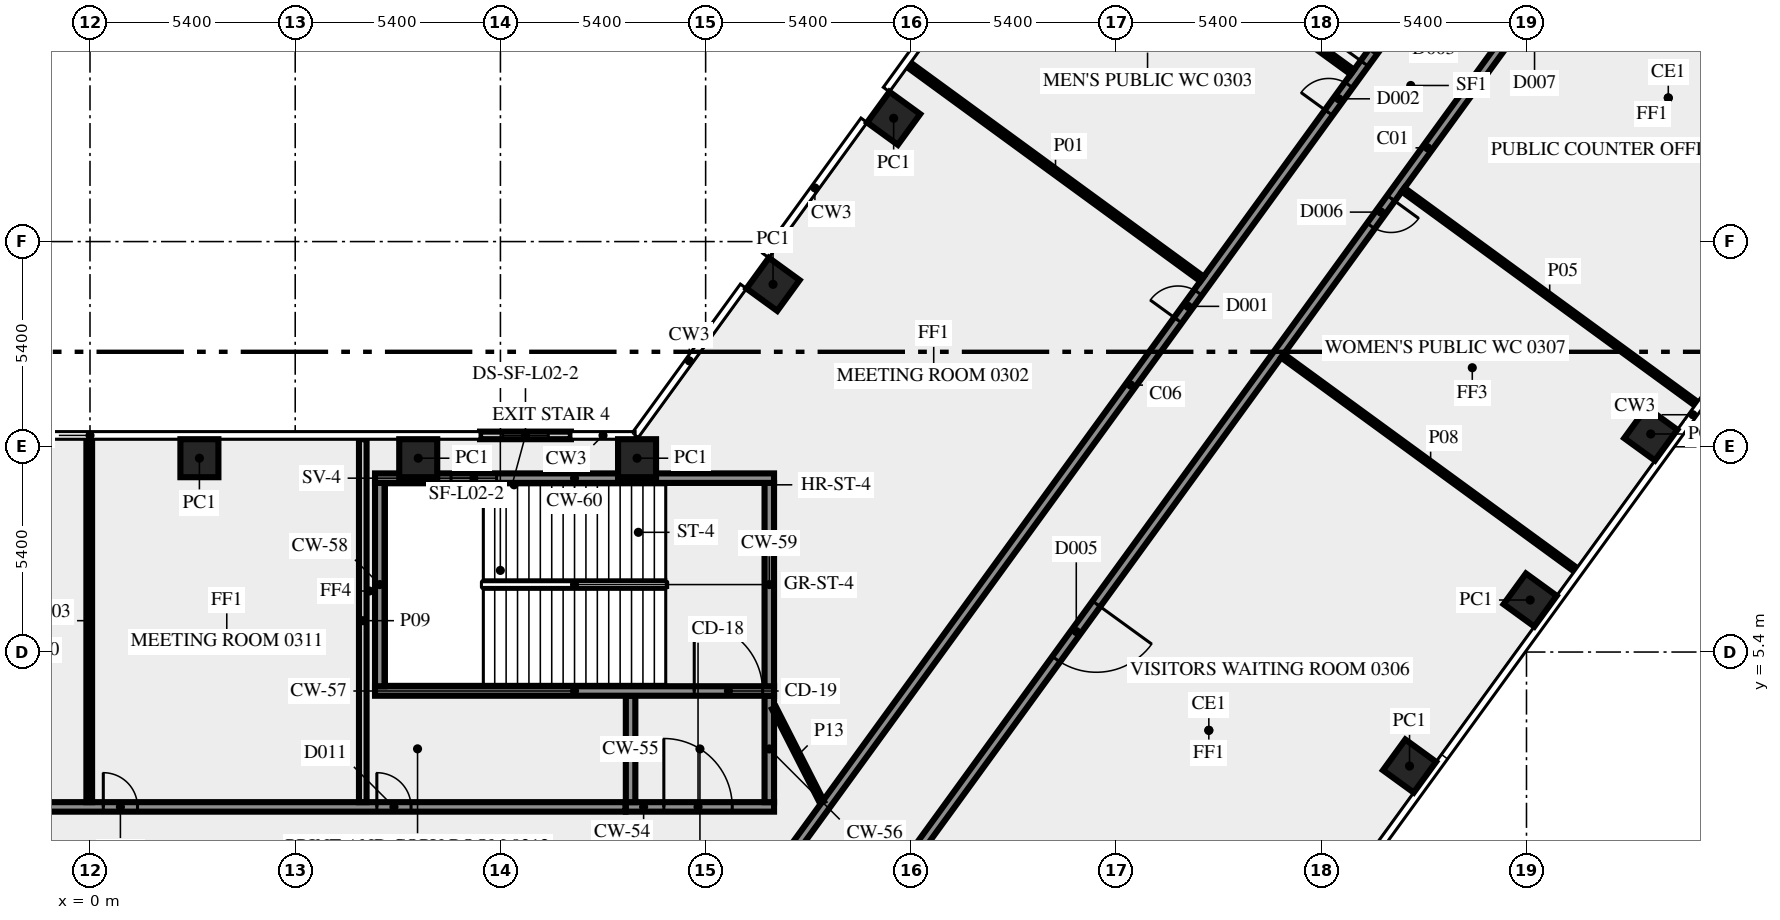
"""IFC4 building model, lengths in metres.
Left out: names, types, materials, properties, quantities, classifications, styles, units other than length and angle.
Written with IfcOpenShell. Run it as: python <this file> out.ifc"""

import sys

from ifc_helpers import new_model, si_unit, direction, frame, frame_2d, origin, origin_2d, place, context, subcontext, project, spatial, rectangle, extrude, element, fill, save


model = new_model("IFC4")
c1 = context("Model", 3, precision=1e-05, world=origin(), true_north=direction((0.0, 1.0)))
c2 = subcontext(c1, "Body", "Model", "MODEL_VIEW")
j1 = project(units=[si_unit("LENGTHUNIT", "METRE"), si_unit("PLANEANGLEUNIT", "RADIAN")], contexts=[c1])
p1 = place(None, origin())
s1 = spatial("IfcSite", under=j1, at=p1, CompositionType="ELEMENT")
p2 = place(p1, origin())
s2 = spatial("IfcBuilding", under=s1, at=p2, CompositionType="ELEMENT")
p3 = place(p2, frame((0.0, 0.0, 16.0)))
s3 = spatial("IfcBuildingStorey", under=s2, at=p3, CompositionType="ELEMENT", Elevation=16.0)
for number, where, z_axis, x_axis in (
    (1, (34.722, 2.4, 0.0), (0.0, 0.0, 1.0), (0.588, 0.809, 0.0)),
    (2, (37.896, 6.769, 0.0), (0.0, 0.0, 1.0), (0.588, 0.809, 0.0)),
    (3, (41.07, 11.137, 0.0), (0.0, 0.0, 1.0), (0.588, 0.809, 0.0)),
    (4, (21.147, 19.444, 0.0), (0.0, 0.0, 1.0), (-0.588, -0.809, 0.0)),
    (5, (17.974, 15.075, 0.0), (0.0, 0.0, 1.0), (-0.588, -0.809, 0.0)),
    (6, (14.395, 10.5, 0.0), (0.0, 0.0, 1.0), (-1.0, 0.0, 0.0)),
    (7, (8.637, 10.5, 0.0), (0.0, 0.0, 1.0), (-1.0, 0.0, 0.0)),
    (8, (2.879, 10.5, 0.0), (0.0, 0.0, 1.0), (-1.0, 0.0, 0.0)),
):
    element("IfcColumn", number, at=place(p3, frame(where, z_axis=z_axis, x_axis=x_axis)), inside=s3, PredefinedType="COLUMN", context=c2, shape_type="SweptSolid", body=[
        extrude(rectangle(XDim=1.0, YDim=1.0, at=origin_2d()), origin(), (0.0, 0.0, 1.0), 4.1),
    ])
p4 = place(p3, frame((12.655, 11.1, 0.0), z_axis=(0.0, 0.0, 1.0), x_axis=(-1.0, 0.0, 0.0)))
e9 = element("IfcWall", 9, at=p4, inside=s3, PredefinedType="SOLIDWALL", context=c2, shape_type="SweptSolid", body=[
    extrude(rectangle(XDim=2.392, YDim=0.2, at=frame_2d((1.196, 0.0))), origin(), (0.0, 0.0, 1.0), 4.1),
])
p5 = place(p4, frame((0.596, 0.0, 1.0)))
e10 = element("IfcOpeningElement", 10, at=p5, cuts=e9, PredefinedType="OPENING", context=c2, shape_type="SweptSolid", body=[
    extrude(rectangle(XDim=1.2, YDim=1.2, at=frame_2d((0.6, 0.6))), frame((0.0, 0.11, 0.0), z_axis=(0.0, -1.0, 0.0), x_axis=(1.0, 0.0, 0.0)), (0.0, 0.0, 1.0), 0.22),
])
p6 = place(p3, frame((14.1, 1.325, 0.0), z_axis=(0.0, 0.0, 1.0), x_axis=(1.0, 0.0, 0.0)))
e11 = element("IfcWall", 11, at=p6, inside=s3, PredefinedType="SHEAR", context=c2, shape_type="SweptSolid", body=[
    extrude(rectangle(XDim=3.9, YDim=0.25, at=frame_2d((1.95, 0.0))), origin(), (0.0, 0.0, 1.0), 4.1),
])
p7 = place(p6, frame((1.0, 0.0, 0.0)))
e12 = element("IfcOpeningElement", 12, at=p7, cuts=e11, PredefinedType="OPENING", context=c2, shape_type="SweptSolid", body=[
    extrude(rectangle(XDim=1.8, YDim=2.1, at=frame_2d((0.9, 1.05))), frame((0.0, 0.135, 0.0), z_axis=(0.0, -1.0, 0.0), x_axis=(1.0, 0.0, 0.0)), (0.0, 0.0, 1.0), 0.27),
])
for number, where, z_axis, x_axis in (
    (13, (14.225, 1.45, 0.0), (0.0, 0.0, 1.0), (0.0, 1.0, 0.0)),
    (14, (17.875, 1.45, 0.0), (0.0, 0.0, 1.0), (0.0, 1.0, 0.0)),
):
    element("IfcWall", number, at=place(p3, frame(where, z_axis=z_axis, x_axis=x_axis)), inside=s3, PredefinedType="SHEAR", context=c2, shape_type="SweptSolid", body=[
        extrude(rectangle(XDim=2.8, YDim=0.25, at=frame_2d((1.4, 0.0))), origin(), (0.0, 0.0, 1.0), 4.1),
    ])
p8 = place(p3, frame((7.5, 4.375, 0.0), z_axis=(0.0, 0.0, 1.0), x_axis=(1.0, 0.0, 0.0)))
e15 = element("IfcWall", 15, at=p8, inside=s3, PredefinedType="SHEAR", context=c2, shape_type="SweptSolid", body=[
    extrude(rectangle(XDim=10.5, YDim=0.25, at=frame_2d((5.25, 0.0))), origin(), (0.0, 0.0, 1.0), 4.1),
])
p9 = place(p8, frame((8.4, 0.0, 0.0)))
e16 = element("IfcOpeningElement", 16, at=p9, cuts=e15, PredefinedType="OPENING", context=c2, shape_type="SweptSolid", body=[
    extrude(rectangle(XDim=1.8, YDim=2.1, at=frame_2d((0.9, 1.05))), frame((0.0, 0.135, 0.0), z_axis=(0.0, -1.0, 0.0), x_axis=(1.0, 0.0, 0.0)), (0.0, 0.0, 1.0), 0.27),
])
for number, where, z_axis, x_axis in (
    (17, (7.625, 4.5, 0.0), (0.0, 0.0, 1.0), (0.0, 1.0, 0.0)),
    (18, (17.875, 4.5, 0.0), (0.0, 0.0, 1.0), (0.0, 1.0, 0.0)),
):
    element("IfcWall", number, at=place(p3, frame(where, z_axis=z_axis, x_axis=x_axis)), inside=s3, PredefinedType="SHEAR", context=c2, shape_type="SweptSolid", body=[
        extrude(rectangle(XDim=5.35, YDim=0.25, at=frame_2d((2.675, 0.0))), origin(), (0.0, 0.0, 1.0), 4.1),
    ])
p10 = place(p3, frame((7.5, 9.975, 0.0), z_axis=(0.0, 0.0, 1.0), x_axis=(1.0, 0.0, 0.0)))
e19 = element("IfcWall", 19, at=p10, inside=s3, PredefinedType="SHEAR", context=c2, shape_type="SweptSolid", body=[
    extrude(rectangle(XDim=10.5, YDim=0.25, at=frame_2d((5.25, 0.0))), origin(), (0.0, 0.0, 1.0), 4.1),
])
p11 = place(p10, frame((2.0, 0.0, 1.0)))
e20 = element("IfcOpeningElement", 20, at=p11, cuts=e19, PredefinedType="OPENING", context=c2, shape_type="SweptSolid", body=[
    extrude(rectangle(XDim=1.2, YDim=1.2, at=frame_2d((0.6, 0.6))), frame((0.0, 0.135, 0.0), z_axis=(0.0, -1.0, 0.0), x_axis=(1.0, 0.0, 0.0)), (0.0, 0.0, 1.0), 0.27),
])
p12 = place(p3, frame((49.869, 38.856, 0.0), z_axis=(0.0, 0.0, 1.0), x_axis=(-0.587784522481, -0.809017524614, 0.0)))
e21 = element("IfcWall", 21, at=p12, inside=s3, PredefinedType="SOLIDWALL", context=c2, shape_type="SweptSolid", body=[
    extrude(rectangle(XDim=49.912, YDim=0.25, at=frame_2d((24.956, 0.0))), origin(), (0.0, 0.0, 1.0), 4.1),
])
p13 = place(p12, frame((19.271, 0.0, 0.0)))
e22 = element("IfcOpeningElement", 22, at=p13, cuts=e21, PredefinedType="OPENING", context=c2, shape_type="SweptSolid", body=[
    extrude(rectangle(XDim=1.8, YDim=2.1, at=frame_2d((0.9, 1.05))), frame((0.0, 0.135, 0.0), z_axis=(0.0, -1.0, 0.0), x_axis=(1.0, 0.0, 0.0)), (0.0, 0.0, 1.0), 0.27),
])
p14 = place(p12, frame((26.596, 0.0, 0.0)))
e23 = element("IfcOpeningElement", 23, at=p14, cuts=e21, PredefinedType="OPENING", context=c2, shape_type="SweptSolid", body=[
    extrude(rectangle(XDim=0.9, YDim=2.1, at=frame_2d((0.45, 1.05))), frame((0.0, 0.135, 0.0), z_axis=(0.0, -1.0, 0.0), x_axis=(1.0, 0.0, 0.0)), (0.0, 0.0, 1.0), 0.27),
])
p15 = place(p12, frame((12.846, 0.0, 0.0)))
e24 = element("IfcOpeningElement", 24, at=p15, cuts=e21, PredefinedType="OPENING", context=c2, shape_type="SweptSolid", body=[
    extrude(rectangle(XDim=0.9, YDim=2.1, at=frame_2d((0.45, 1.05))), frame((0.0, 0.135, 0.0), z_axis=(0.0, -1.0, 0.0), x_axis=(1.0, 0.0, 0.0)), (0.0, 0.0, 1.0), 0.27),
])
p16 = place(p12, frame((39.788, 0.0, 0.0)))
e25 = element("IfcOpeningElement", 25, at=p16, cuts=e21, PredefinedType="OPENING", context=c2, shape_type="SweptSolid", body=[
    extrude(rectangle(XDim=1.8, YDim=2.1, at=frame_2d((0.9, 1.05))), frame((0.0, 0.135, 0.0), z_axis=(0.0, -1.0, 0.0), x_axis=(1.0, 0.0, 0.0)), (0.0, 0.0, 1.0), 0.27),
])
p17 = place(p3, frame((-14.09, 1.325, 0.0), z_axis=(0.0, 0.0, 1.0), x_axis=(1.0, 0.0, 0.0)))
e26 = element("IfcWall", 26, at=p17, inside=s3, PredefinedType="SOLIDWALL", context=c2, shape_type="SweptSolid", body=[
    extrude(rectangle(XDim=28.18, YDim=0.25, at=frame_2d((14.09, 0.0))), origin(), (0.0, 0.0, 1.0), 4.1),
])
p18 = place(p17, frame((0.34, 0.0, 0.0)))
e27 = element("IfcOpeningElement", 27, at=p18, cuts=e26, PredefinedType="OPENING", context=c2, shape_type="SweptSolid", body=[
    extrude(rectangle(XDim=0.9, YDim=2.1, at=frame_2d((0.45, 1.05))), frame((0.0, 0.135, 0.0), z_axis=(0.0, -1.0, 0.0), x_axis=(1.0, 0.0, 0.0)), (0.0, 0.0, 1.0), 0.27),
])
p19 = place(p17, frame((14.44, 0.0, 0.0)))
e28 = element("IfcOpeningElement", 28, at=p19, cuts=e26, PredefinedType="OPENING", context=c2, shape_type="SweptSolid", body=[
    extrude(rectangle(XDim=0.9, YDim=2.1, at=frame_2d((0.45, 1.05))), frame((0.0, 0.135, 0.0), z_axis=(0.0, -1.0, 0.0), x_axis=(1.0, 0.0, 0.0)), (0.0, 0.0, 1.0), 0.27),
])
p20 = place(p17, frame((21.638, 0.0, 0.0)))
e29 = element("IfcOpeningElement", 29, at=p20, cuts=e26, PredefinedType="OPENING", context=c2, shape_type="SweptSolid", body=[
    extrude(rectangle(XDim=0.9, YDim=2.1, at=frame_2d((0.45, 1.05))), frame((0.0, 0.135, 0.0), z_axis=(0.0, -1.0, 0.0), x_axis=(1.0, 0.0, 0.0)), (0.0, 0.0, 1.0), 0.27),
])
p21 = place(p3, frame((17.545, -1.125, 0.0), z_axis=(0.0, 0.0, 1.0), x_axis=(0.587786323093, 0.809016216391, 0.0)))
e30 = element("IfcWall", 30, at=p21, inside=s3, PredefinedType="SOLIDWALL", context=c2, shape_type="SweptSolid", body=[
    extrude(rectangle(XDim=33.493, YDim=0.25, at=frame_2d((16.747, 0.0))), origin(), (0.0, 0.0, 1.0), 4.1),
])
p22 = place(p21, frame((25.608, 0.0, 0.0)))
e31 = element("IfcOpeningElement", 31, at=p22, cuts=e30, PredefinedType="OPENING", context=c2, shape_type="SweptSolid", body=[
    extrude(rectangle(XDim=0.9, YDim=2.1, at=frame_2d((0.45, 1.05))), frame((0.0, 0.135, 0.0), z_axis=(0.0, -1.0, 0.0), x_axis=(1.0, 0.0, 0.0)), (0.0, 0.0, 1.0), 0.27),
])
p23 = place(p21, frame((18.858, 0.0, 0.0)))
e32 = element("IfcOpeningElement", 32, at=p23, cuts=e30, PredefinedType="OPENING", context=c2, shape_type="SweptSolid", body=[
    extrude(rectangle(XDim=0.9, YDim=2.1, at=frame_2d((0.45, 1.05))), frame((0.0, 0.135, 0.0), z_axis=(0.0, -1.0, 0.0), x_axis=(1.0, 0.0, 0.0)), (0.0, 0.0, 1.0), 0.27),
])
p24 = place(p21, frame((27.208, 0.0, 0.0)))
e33 = element("IfcOpeningElement", 33, at=p24, cuts=e30, PredefinedType="OPENING", context=c2, shape_type="SweptSolid", body=[
    extrude(rectangle(XDim=0.9, YDim=2.1, at=frame_2d((0.45, 1.05))), frame((0.0, 0.135, 0.0), z_axis=(0.0, -1.0, 0.0), x_axis=(1.0, 0.0, 0.0)), (0.0, 0.0, 1.0), 0.27),
])
p25 = place(p3, frame((21.55, 20.848, 0.0), z_axis=(0.0, 0.0, 1.0), x_axis=(0.807606997933, -0.589721067023, 0.0)))
e34 = element("IfcWall", 34, at=p25, inside=s3, PredefinedType="PARTITIONING", context=c2, shape_type="SweptSolid", body=[
    extrude(rectangle(XDim=9.55, YDim=0.15, at=frame_2d((4.775, 0.0))), origin(), (0.0, 0.0, 1.0), 3.1),
])
p26 = place(p3, frame((33.218, 20.661, 0.0), z_axis=(0.0, 0.0, 1.0), x_axis=(-0.808989175209, 0.587823540184, 0.0)))
e35 = element("IfcWall", 35, at=p26, inside=s3, PredefinedType="PARTITIONING", context=c2, shape_type="SweptSolid", body=[
    extrude(rectangle(XDim=9.55, YDim=0.15, at=frame_2d((4.775, 0.0))), origin(), (0.0, 0.0, 1.0), 3.1),
])
p27 = place(p3, frame((-0.02, 1.45, 0.0), z_axis=(0.0, 0.0, 1.0), x_axis=(0.0, 1.0, 0.0)))
e36 = element("IfcWall", 36, at=p27, inside=s3, PredefinedType="PARTITIONING", context=c2, shape_type="SweptSolid", body=[
    extrude(rectangle(XDim=9.55, YDim=0.15, at=frame_2d((4.775, 0.0))), origin(), (0.0, 0.0, 1.0), 3.1),
])
p28 = place(p3, frame((34.554, 17.565, 0.0), z_axis=(0.0, 0.0, 1.0), x_axis=(0.807645841498, -0.589667868135, 0.0)))
e37 = element("IfcWall", 37, at=p28, inside=s3, PredefinedType="PARTITIONING", context=c2, shape_type="SweptSolid", body=[
    extrude(rectangle(XDim=9.551, YDim=0.12, at=frame_2d((4.775, 0.0))), origin(), (0.0, 0.0, 1.0), 3.1),
])
p29 = place(p3, frame((31.38, 13.196, 0.0), z_axis=(0.0, 0.0, 1.0), x_axis=(0.807701085448, -0.589592195137, 0.0)))
e38 = element("IfcWall", 38, at=p29, inside=s3, PredefinedType="PARTITIONING", context=c2, shape_type="SweptSolid", body=[
    extrude(rectangle(XDim=9.651, YDim=0.12, at=frame_2d((4.826, 0.0))), origin(), (0.0, 0.0, 1.0), 3.1),
])
p30 = place(p3, frame((7.178, 1.45, 0.0), z_axis=(0.0, 0.0, 1.0), x_axis=(0.0, 1.0, 0.0)))
e39 = element("IfcWall", 39, at=p30, inside=s3, PredefinedType="SOLIDWALL", context=c2, shape_type="SweptSolid", body=[
    extrude(rectangle(XDim=9.55, YDim=0.2, at=frame_2d((4.775, 0.0))), origin(), (0.0, 0.0, 1.0), 3.1),
])
p31 = place(p3, frame((18.0, 3.925, 0.0), z_axis=(0.0, 0.0, 1.0), x_axis=(0.453950796792, -0.891026752736, 0.0)))
e40 = element("IfcWall", 40, at=p31, inside=s3, PredefinedType="PARTITIONING", context=c2, shape_type="SweptSolid", body=[
    extrude(rectangle(XDim=2.778, YDim=0.12, at=frame_2d((1.389, 0.0))), origin(), (0.0, 0.0, 1.0), 4.1),
])
p32 = place(p5, origin())
e41 = element("IfcWindow", 41, at=p32, inside=s3, PartitioningType="SINGLE_PANEL", PredefinedType="WINDOW", context=c2, shape_type="SweptSolid", body=[
    extrude(rectangle(XDim=1.2, YDim=1.2, at=frame_2d((0.6, 0.6))), frame((0.0, 0.03, 0.0), z_axis=(0.0, -1.0, 0.0), x_axis=(1.0, 0.0, 0.0)), (0.0, 0.0, 1.0), 0.06),
])
fill(e10, e41)
p33 = place(p7, origin())
e42 = element("IfcDoor", 42, at=p33, inside=s3, OperationType="DOUBLE_DOOR_SINGLE_SWING", PredefinedType="DOOR", context=c2, shape_type="SweptSolid", body=[
    extrude(rectangle(XDim=1.8, YDim=2.1, at=frame_2d((0.9, 1.05))), frame((0.0, 0.025, 0.0), z_axis=(0.0, -1.0, 0.0), x_axis=(1.0, 0.0, 0.0)), (0.0, 0.0, 1.0), 0.05),
])
fill(e12, e42)
p34 = place(p9, origin())
e43 = element("IfcDoor", 43, at=p34, inside=s3, OperationType="DOUBLE_DOOR_SINGLE_SWING", PredefinedType="DOOR", context=c2, shape_type="SweptSolid", body=[
    extrude(rectangle(XDim=1.8, YDim=2.1, at=frame_2d((0.9, 1.05))), frame((0.0, 0.025, 0.0), z_axis=(0.0, -1.0, 0.0), x_axis=(1.0, 0.0, 0.0)), (0.0, 0.0, 1.0), 0.05),
])
fill(e16, e43)
p35 = place(p11, origin())
e44 = element("IfcWindow", 44, at=p35, inside=s3, PartitioningType="SINGLE_PANEL", PredefinedType="WINDOW", context=c2, shape_type="SweptSolid", body=[
    extrude(rectangle(XDim=1.2, YDim=1.2, at=frame_2d((0.6, 0.6))), frame((0.0, 0.03, 0.0), z_axis=(0.0, -1.0, 0.0), x_axis=(1.0, 0.0, 0.0)), (0.0, 0.0, 1.0), 0.06),
])
fill(e20, e44)
p36 = place(p22, origin())
e45 = element("IfcDoor", 45, at=p36, inside=s3, OperationType="SINGLE_SWING_RIGHT", PredefinedType="DOOR", context=c2, shape_type="SweptSolid", body=[
    extrude(rectangle(XDim=0.9, YDim=2.1, at=frame_2d((0.45, 1.05))), frame((0.0, 0.025, 0.0), z_axis=(0.0, -1.0, 0.0), x_axis=(1.0, 0.0, 0.0)), (0.0, 0.0, 1.0), 0.05),
])
fill(e31, e45)
p37 = place(p14, origin())
e46 = element("IfcDoor", 46, at=p37, inside=s3, OperationType="SINGLE_SWING_LEFT", PredefinedType="DOOR", context=c2, shape_type="SweptSolid", body=[
    extrude(rectangle(XDim=0.9, YDim=2.1, at=frame_2d((0.45, 1.05))), frame((0.0, 0.025, 0.0), z_axis=(0.0, -1.0, 0.0), x_axis=(1.0, 0.0, 0.0)), (0.0, 0.0, 1.0), 0.05),
])
fill(e23, e46)
p38 = place(p23, origin())
e47 = element("IfcDoor", 47, at=p38, inside=s3, OperationType="SINGLE_SWING_RIGHT", PredefinedType="DOOR", context=c2, shape_type="SweptSolid", body=[
    extrude(rectangle(XDim=0.9, YDim=2.1, at=frame_2d((0.45, 1.05))), frame((0.0, 0.025, 0.0), z_axis=(0.0, -1.0, 0.0), x_axis=(1.0, 0.0, 0.0)), (0.0, 0.0, 1.0), 0.05),
])
fill(e32, e47)
p39 = place(p24, origin())
e48 = element("IfcDoor", 48, at=p39, inside=s3, OperationType="SINGLE_SWING_LEFT", PredefinedType="DOOR", context=c2, shape_type="SweptSolid", body=[
    extrude(rectangle(XDim=0.9, YDim=2.1, at=frame_2d((0.45, 1.05))), frame((0.0, 0.025, 0.0), z_axis=(0.0, -1.0, 0.0), x_axis=(1.0, 0.0, 0.0)), (0.0, 0.0, 1.0), 0.05),
])
fill(e33, e48)
p40 = place(p19, origin())
e49 = element("IfcDoor", 49, at=p40, inside=s3, OperationType="SINGLE_SWING_LEFT", PredefinedType="DOOR", context=c2, shape_type="SweptSolid", body=[
    extrude(rectangle(XDim=0.9, YDim=2.1, at=frame_2d((0.45, 1.05))), frame((0.0, 0.025, 0.0), z_axis=(0.0, -1.0, 0.0), x_axis=(1.0, 0.0, 0.0)), (0.0, 0.0, 1.0), 0.05),
])
fill(e28, e49)
p41 = place(p20, origin())
e50 = element("IfcDoor", 50, at=p41, inside=s3, OperationType="SINGLE_SWING_LEFT", PredefinedType="DOOR", context=c2, shape_type="SweptSolid", body=[
    extrude(rectangle(XDim=0.9, YDim=2.1, at=frame_2d((0.45, 1.05))), frame((0.0, 0.025, 0.0), z_axis=(0.0, -1.0, 0.0), x_axis=(1.0, 0.0, 0.0)), (0.0, 0.0, 1.0), 0.05),
])
fill(e29, e50)
p42 = place(p16, origin())
e51 = element("IfcDoor", 51, at=p42, inside=s3, OperationType="DOUBLE_DOOR_SINGLE_SWING", PredefinedType="DOOR", context=c2, shape_type="SweptSolid", body=[
    extrude(rectangle(XDim=1.8, YDim=2.1, at=frame_2d((0.9, 1.05))), frame((0.0, 0.025, 0.0), z_axis=(0.0, -1.0, 0.0), x_axis=(1.0, 0.0, 0.0)), (0.0, 0.0, 1.0), 0.05),
])
fill(e25, e51)
save(model, sys.argv[1])
